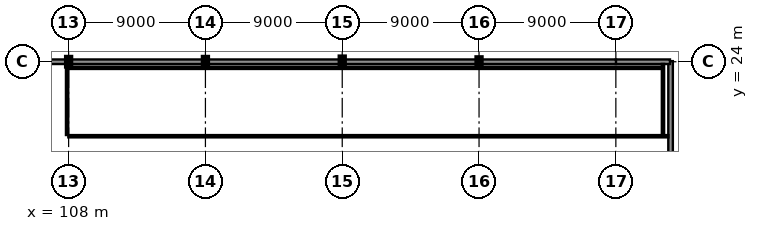
"""IFC4 building model, lengths in metres.
Left out: names, types, materials, properties, quantities, classifications, styles, units other than length and angle.
Written with IfcOpenShell. Run it as: python <this file> out.ifc"""

import sys

from ifc_helpers import new_model, si_unit, direction, frame, frame_2d, origin, origin_2d, place, context, subcontext, project, spatial, rectangle, i_section, extrude, element, fill, save


model = new_model("IFC4")
c1 = context("Model", 3, precision=1e-05, world=origin(), true_north=direction((0.0, 1.0)))
c2 = subcontext(c1, "Body", "Model", "MODEL_VIEW")
j1 = project(units=[si_unit("LENGTHUNIT", "METRE"), si_unit("PLANEANGLEUNIT", "RADIAN")], contexts=[c1])
p1 = place(None, origin())
s1 = spatial("IfcSite", under=j1, at=p1, CompositionType="ELEMENT")
p2 = place(p1, origin())
s2 = spatial("IfcBuilding", under=s1, at=p2, CompositionType="ELEMENT")
p3 = place(p2, frame((0.0, 0.0, 18.9)))
s3 = spatial("IfcBuildingStorey", under=s2, at=p3, CompositionType="ELEMENT", Elevation=18.9)
for number, where, z_axis, x_axis in (
    (1, (108.0, 24.0, 0.0), (0.0, 0.0, 1.0), (1.0, 0.0, 0.0)),
    (2, (117.0, 24.0, 0.0), (0.0, 0.0, 1.0), (1.0, 0.0, 0.0)),
):
    element("IfcColumn", number, at=place(p3, frame(where, z_axis=z_axis, x_axis=x_axis)), inside=s3, PredefinedType="COLUMN", context=c2, shape_type="SweptSolid", body=[
        extrude(i_section(OverallWidth=0.3, OverallDepth=0.6, WebThickness=0.015, FlangeThickness=0.03, at=origin_2d()), origin(), (0.0, 0.0, 1.0), 4.5),
    ])
p4 = place(p3, frame((126.0, 24.0, 0.0), z_axis=(0.0, 0.0, 1.0), x_axis=(1.0, 0.0, 0.0)))
e3 = element("IfcColumn", 3, at=p4, inside=s3, PredefinedType="COLUMN", context=c2, shape_type="SweptSolid", body=[
    extrude(i_section(OverallWidth=0.3, OverallDepth=0.65, WebThickness=0.016, FlangeThickness=0.031, at=origin_2d()), origin(), (0.0, 0.0, 1.0), 4.5),
])
p5 = place(p3, frame((135.0, 24.0, 0.0), z_axis=(0.0, 0.0, 1.0), x_axis=(1.0, 0.0, 0.0)))
e4 = element("IfcColumn", 4, at=p5, inside=s3, PredefinedType="COLUMN", context=c2, shape_type="SweptSolid", body=[
    extrude(i_section(OverallWidth=0.3, OverallDepth=0.55, WebThickness=0.015, FlangeThickness=0.029, at=origin_2d()), origin(), (0.0, 0.0, 1.0), 4.5),
])
p6 = place(p3, frame((147.6, 11.99, 0.0), z_axis=(0.0, 0.0, 1.0), x_axis=(0.0, 1.0, 0.0)))
e5 = element("IfcWall", 5, at=p6, inside=s3, PredefinedType="SOLIDWALL", context=c2, shape_type="SweptSolid", body=[
    extrude(rectangle(XDim=12.05, YDim=0.3, at=frame_2d((6.025, 0.0))), origin(), (0.0, 0.0, 1.0), 3.555),
])
p7 = place(p6, frame((1.47, 0.0, 0.85)))
e6 = element("IfcOpeningElement", 6, at=p7, cuts=e5, PredefinedType="OPENING", context=c2, shape_type="SweptSolid", body=[
    extrude(rectangle(XDim=2.0, YDim=2.0, at=frame_2d((1.0, 1.0))), frame((0.0, 0.165, 0.0), z_axis=(0.0, -1.0, 0.0), x_axis=(1.0, 0.0, 0.0)), (0.0, 0.0, 1.0), 0.33),
])
p8 = place(p6, frame((7.676, 0.0, 0.85)))
e7 = element("IfcOpeningElement", 7, at=p8, cuts=e5, PredefinedType="OPENING", context=c2, shape_type="SweptSolid", body=[
    extrude(rectangle(XDim=2.0, YDim=2.0, at=frame_2d((1.0, 1.0))), frame((0.0, 0.165, 0.0), z_axis=(0.0, -1.0, 0.0), x_axis=(1.0, 0.0, 0.0)), (0.0, 0.0, 1.0), 0.33),
])
p9 = place(p3, frame((147.56, 24.0, 0.0), z_axis=(0.0, 0.0, 1.0), x_axis=(-1.0, 0.0, 0.0)))
e8 = element("IfcWall", 8, at=p9, inside=s3, PredefinedType="SOLIDWALL", context=c2, shape_type="SweptSolid", body=[
    extrude(rectangle(XDim=3.57, YDim=0.3, at=frame_2d((1.785, 0.0))), origin(), (0.0, 0.0, 1.0), 3.247),
])
p10 = place(p3, frame((144.01, 24.0, 0.0), z_axis=(0.0, 0.0, 1.0), x_axis=(-1.0, 0.0, 0.0)))
e9 = element("IfcWall", 9, at=p10, inside=s3, PredefinedType="SOLIDWALL", context=c2, shape_type="SweptSolid", body=[
    extrude(rectangle(XDim=9.002, YDim=0.3, at=frame_2d((4.501, 0.0))), origin(), (0.0, 0.0, 1.0), 3.247),
])
p11 = place(p3, frame((134.992, 24.0, 0.0), z_axis=(0.0, 0.0, 1.0), x_axis=(-1.0, 0.0, 0.0)))
e10 = element("IfcWall", 10, at=p11, inside=s3, PredefinedType="SOLIDWALL", context=c2, shape_type="SweptSolid", body=[
    extrude(rectangle(XDim=8.984, YDim=0.3, at=frame_2d((4.492, 0.0))), origin(), (0.0, 0.0, 1.0), 3.247),
])
p12 = place(p11, frame((1.516, 0.0, 0.85)))
e11 = element("IfcOpeningElement", 11, at=p12, cuts=e10, PredefinedType="OPENING", context=c2, shape_type="SweptSolid", body=[
    extrude(rectangle(XDim=2.0, YDim=2.0, at=frame_2d((1.0, 1.0))), frame((0.0, 0.165, 0.0), z_axis=(0.0, -1.0, 0.0), x_axis=(1.0, 0.0, 0.0)), (0.0, 0.0, 1.0), 0.33),
])
p13 = place(p11, frame((5.468, 0.0, 0.85)))
e12 = element("IfcOpeningElement", 12, at=p13, cuts=e10, PredefinedType="OPENING", context=c2, shape_type="SweptSolid", body=[
    extrude(rectangle(XDim=2.0, YDim=2.0, at=frame_2d((1.0, 1.0))), frame((0.0, 0.165, 0.0), z_axis=(0.0, -1.0, 0.0), x_axis=(1.0, 0.0, 0.0)), (0.0, 0.0, 1.0), 0.33),
])
p14 = place(p3, frame((125.992, 24.0, 0.0), z_axis=(0.0, 0.0, 1.0), x_axis=(-1.0, 0.0, 0.0)))
e13 = element("IfcWall", 13, at=p14, inside=s3, PredefinedType="SOLIDWALL", context=c2, shape_type="SweptSolid", body=[
    extrude(rectangle(XDim=8.984, YDim=0.3, at=frame_2d((4.492, 0.0))), origin(), (0.0, 0.0, 1.0), 3.247),
])
p15 = place(p14, frame((1.516, 0.0, 0.85)))
e14 = element("IfcOpeningElement", 14, at=p15, cuts=e13, PredefinedType="OPENING", context=c2, shape_type="SweptSolid", body=[
    extrude(rectangle(XDim=2.0, YDim=2.0, at=frame_2d((1.0, 1.0))), frame((0.0, 0.165, 0.0), z_axis=(0.0, -1.0, 0.0), x_axis=(1.0, 0.0, 0.0)), (0.0, 0.0, 1.0), 0.33),
])
p16 = place(p14, frame((5.468, 0.0, 0.85)))
e15 = element("IfcOpeningElement", 15, at=p16, cuts=e13, PredefinedType="OPENING", context=c2, shape_type="SweptSolid", body=[
    extrude(rectangle(XDim=2.0, YDim=2.0, at=frame_2d((1.0, 1.0))), frame((0.0, 0.165, 0.0), z_axis=(0.0, -1.0, 0.0), x_axis=(1.0, 0.0, 0.0)), (0.0, 0.0, 1.0), 0.33),
])
p17 = place(p3, frame((116.992, 24.0, 0.0), z_axis=(0.0, 0.0, 1.0), x_axis=(-1.0, 0.0, 0.0)))
e16 = element("IfcWall", 16, at=p17, inside=s3, PredefinedType="SOLIDWALL", context=c2, shape_type="SweptSolid", body=[
    extrude(rectangle(XDim=8.984, YDim=0.3, at=frame_2d((4.492, 0.0))), origin(), (0.0, 0.0, 1.0), 3.247),
])
p18 = place(p17, frame((1.516, 0.0, 0.85)))
e17 = element("IfcOpeningElement", 17, at=p18, cuts=e16, PredefinedType="OPENING", context=c2, shape_type="SweptSolid", body=[
    extrude(rectangle(XDim=2.0, YDim=2.0, at=frame_2d((1.0, 1.0))), frame((0.0, 0.165, 0.0), z_axis=(0.0, -1.0, 0.0), x_axis=(1.0, 0.0, 0.0)), (0.0, 0.0, 1.0), 0.33),
])
p19 = place(p17, frame((5.468, 0.0, 0.85)))
e18 = element("IfcOpeningElement", 18, at=p19, cuts=e16, PredefinedType="OPENING", context=c2, shape_type="SweptSolid", body=[
    extrude(rectangle(XDim=2.0, YDim=2.0, at=frame_2d((1.0, 1.0))), frame((0.0, 0.165, 0.0), z_axis=(0.0, -1.0, 0.0), x_axis=(1.0, 0.0, 0.0)), (0.0, 0.0, 1.0), 0.33),
])
p20 = place(p3, frame((107.992, 24.0, 0.0), z_axis=(0.0, 0.0, 1.0), x_axis=(-1.0, 0.0, 0.0)))
e19 = element("IfcWall", 19, at=p20, inside=s3, PredefinedType="SOLIDWALL", context=c2, shape_type="SweptSolid", body=[
    extrude(rectangle(XDim=8.619, YDim=0.3, at=frame_2d((4.31, 0.0))), origin(), (0.0, 0.0, 1.0), 3.345),
])
p21 = place(p20, frame((1.413, 0.0, 0.85)))
e20 = element("IfcOpeningElement", 20, at=p21, cuts=e19, PredefinedType="OPENING", context=c2, shape_type="SweptSolid", body=[
    extrude(rectangle(XDim=2.0, YDim=2.0, at=frame_2d((1.0, 1.0))), frame((0.0, 0.165, 0.0), z_axis=(0.0, -1.0, 0.0), x_axis=(1.0, 0.0, 0.0)), (0.0, 0.0, 1.0), 0.33),
])
p22 = place(p20, frame((5.206, 0.0, 0.85)))
e21 = element("IfcOpeningElement", 21, at=p22, cuts=e19, PredefinedType="OPENING", context=c2, shape_type="SweptSolid", body=[
    extrude(rectangle(XDim=2.0, YDim=2.0, at=frame_2d((1.0, 1.0))), frame((0.0, 0.165, 0.0), z_axis=(0.0, -1.0, 0.0), x_axis=(1.0, 0.0, 0.0)), (0.0, 0.0, 1.0), 0.33),
])
p23 = place(p3, frame((147.1, 23.855, 0.0), z_axis=(0.0, 0.0, 1.0), x_axis=(0.0, -1.0, 0.0)))
e22 = element("IfcWall", 22, at=p23, inside=s3, PredefinedType="PARTITIONING", context=c2, shape_type="SweptSolid", body=[
    extrude(rectangle(XDim=4.675, YDim=0.15, at=frame_2d((2.337, 0.0))), origin(), (0.0, 0.0, 1.0), 4.14),
])
p24 = place(p3, frame((147.455, 19.1, 0.0), z_axis=(0.0, 0.0, 1.0), x_axis=(-1.0, 0.0, 0.0)))
e23 = element("IfcWall", 23, at=p24, inside=s3, PredefinedType="PARTITIONING", context=c2, shape_type="SweptSolid", body=[
    extrude(rectangle(XDim=39.475, YDim=0.15, at=frame_2d((19.738, 0.0))), origin(), (0.0, 0.0, 1.0), 4.14),
])
p25 = place(p24, frame((19.213, 0.0, 0.0)))
e24 = element("IfcOpeningElement", 24, at=p25, cuts=e23, PredefinedType="OPENING", context=c2, shape_type="SweptSolid", body=[
    extrude(rectangle(XDim=1.05, YDim=2.25, at=frame_2d((0.525, 1.125))), frame((0.0, 0.09, 0.0), z_axis=(0.0, -1.0, 0.0), x_axis=(1.0, 0.0, 0.0)), (0.0, 0.0, 1.0), 0.18),
])
p26 = place(p3, frame((107.9, 19.18, 0.0), z_axis=(0.0, 0.0, 1.0), x_axis=(0.0, 1.0, 0.0)))
e25 = element("IfcWall", 25, at=p26, inside=s3, PredefinedType="PARTITIONING", context=c2, shape_type="SweptSolid", body=[
    extrude(rectangle(XDim=4.522, YDim=0.15, at=frame_2d((2.261, 0.0))), origin(), (0.0, 0.0, 1.0), 3.655),
])
p27 = place(p3, frame((107.908, 23.6, 0.0), z_axis=(0.0, 0.0, 1.0), x_axis=(1.0, 0.0, 0.0)))
e26 = element("IfcWall", 26, at=p27, inside=s3, PredefinedType="PARTITIONING", context=c2, shape_type="SweptSolid", body=[
    extrude(rectangle(XDim=39.122, YDim=0.15, at=frame_2d((19.561, 0.0))), origin(), (0.0, 0.0, 1.0), 4.14),
])
p28 = place(p8, origin())
e27 = element("IfcWindow", 27, at=p28, inside=s3, PartitioningType="SINGLE_PANEL", PredefinedType="WINDOW", context=c2, shape_type="SweptSolid", body=[
    extrude(rectangle(XDim=2.0, YDim=2.0, at=frame_2d((1.0, 1.0))), frame((0.0, 0.03, 0.0), z_axis=(0.0, -1.0, 0.0), x_axis=(1.0, 0.0, 0.0)), (0.0, 0.0, 1.0), 0.06),
])
fill(e7, e27)
p29 = place(p12, origin())
e28 = element("IfcWindow", 28, at=p29, inside=s3, PartitioningType="SINGLE_PANEL", PredefinedType="WINDOW", context=c2, shape_type="SweptSolid", body=[
    extrude(rectangle(XDim=2.0, YDim=2.0, at=frame_2d((1.0, 1.0))), frame((0.0, 0.03, 0.0), z_axis=(0.0, -1.0, 0.0), x_axis=(1.0, 0.0, 0.0)), (0.0, 0.0, 1.0), 0.06),
])
fill(e11, e28)
p30 = place(p13, origin())
e29 = element("IfcWindow", 29, at=p30, inside=s3, PartitioningType="SINGLE_PANEL", PredefinedType="WINDOW", context=c2, shape_type="SweptSolid", body=[
    extrude(rectangle(XDim=2.0, YDim=2.0, at=frame_2d((1.0, 1.0))), frame((0.0, 0.03, 0.0), z_axis=(0.0, -1.0, 0.0), x_axis=(1.0, 0.0, 0.0)), (0.0, 0.0, 1.0), 0.06),
])
fill(e12, e29)
p31 = place(p15, origin())
e30 = element("IfcWindow", 30, at=p31, inside=s3, PartitioningType="SINGLE_PANEL", PredefinedType="WINDOW", context=c2, shape_type="SweptSolid", body=[
    extrude(rectangle(XDim=2.0, YDim=2.0, at=frame_2d((1.0, 1.0))), frame((0.0, 0.03, 0.0), z_axis=(0.0, -1.0, 0.0), x_axis=(1.0, 0.0, 0.0)), (0.0, 0.0, 1.0), 0.06),
])
fill(e14, e30)
p32 = place(p16, origin())
e31 = element("IfcWindow", 31, at=p32, inside=s3, PartitioningType="SINGLE_PANEL", PredefinedType="WINDOW", context=c2, shape_type="SweptSolid", body=[
    extrude(rectangle(XDim=2.0, YDim=2.0, at=frame_2d((1.0, 1.0))), frame((0.0, 0.03, 0.0), z_axis=(0.0, -1.0, 0.0), x_axis=(1.0, 0.0, 0.0)), (0.0, 0.0, 1.0), 0.06),
])
fill(e15, e31)
p33 = place(p18, origin())
e32 = element("IfcWindow", 32, at=p33, inside=s3, PartitioningType="SINGLE_PANEL", PredefinedType="WINDOW", context=c2, shape_type="SweptSolid", body=[
    extrude(rectangle(XDim=2.0, YDim=2.0, at=frame_2d((1.0, 1.0))), frame((0.0, 0.03, 0.0), z_axis=(0.0, -1.0, 0.0), x_axis=(1.0, 0.0, 0.0)), (0.0, 0.0, 1.0), 0.06),
])
fill(e17, e32)
p34 = place(p19, origin())
e33 = element("IfcWindow", 33, at=p34, inside=s3, PartitioningType="SINGLE_PANEL", PredefinedType="WINDOW", context=c2, shape_type="SweptSolid", body=[
    extrude(rectangle(XDim=2.0, YDim=2.0, at=frame_2d((1.0, 1.0))), frame((0.0, 0.03, 0.0), z_axis=(0.0, -1.0, 0.0), x_axis=(1.0, 0.0, 0.0)), (0.0, 0.0, 1.0), 0.06),
])
fill(e18, e33)
p35 = place(p25, frame((1.05, 0.0, 0.0), z_axis=(0.0, 0.0, 1.0), x_axis=(-1.0, 0.0, 0.0)))
e34 = element("IfcDoor", 34, at=p35, inside=s3, OperationType="SINGLE_SWING_RIGHT", PredefinedType="DOOR", context=c2, shape_type="SweptSolid", body=[
    extrude(rectangle(XDim=1.05, YDim=2.25, at=frame_2d((0.525, 1.125))), frame((0.0, 0.025, 0.0), z_axis=(0.0, -1.0, 0.0), x_axis=(1.0, 0.0, 0.0)), (0.0, 0.0, 1.0), 0.05),
])
fill(e24, e34)
save(model, sys.argv[1])
